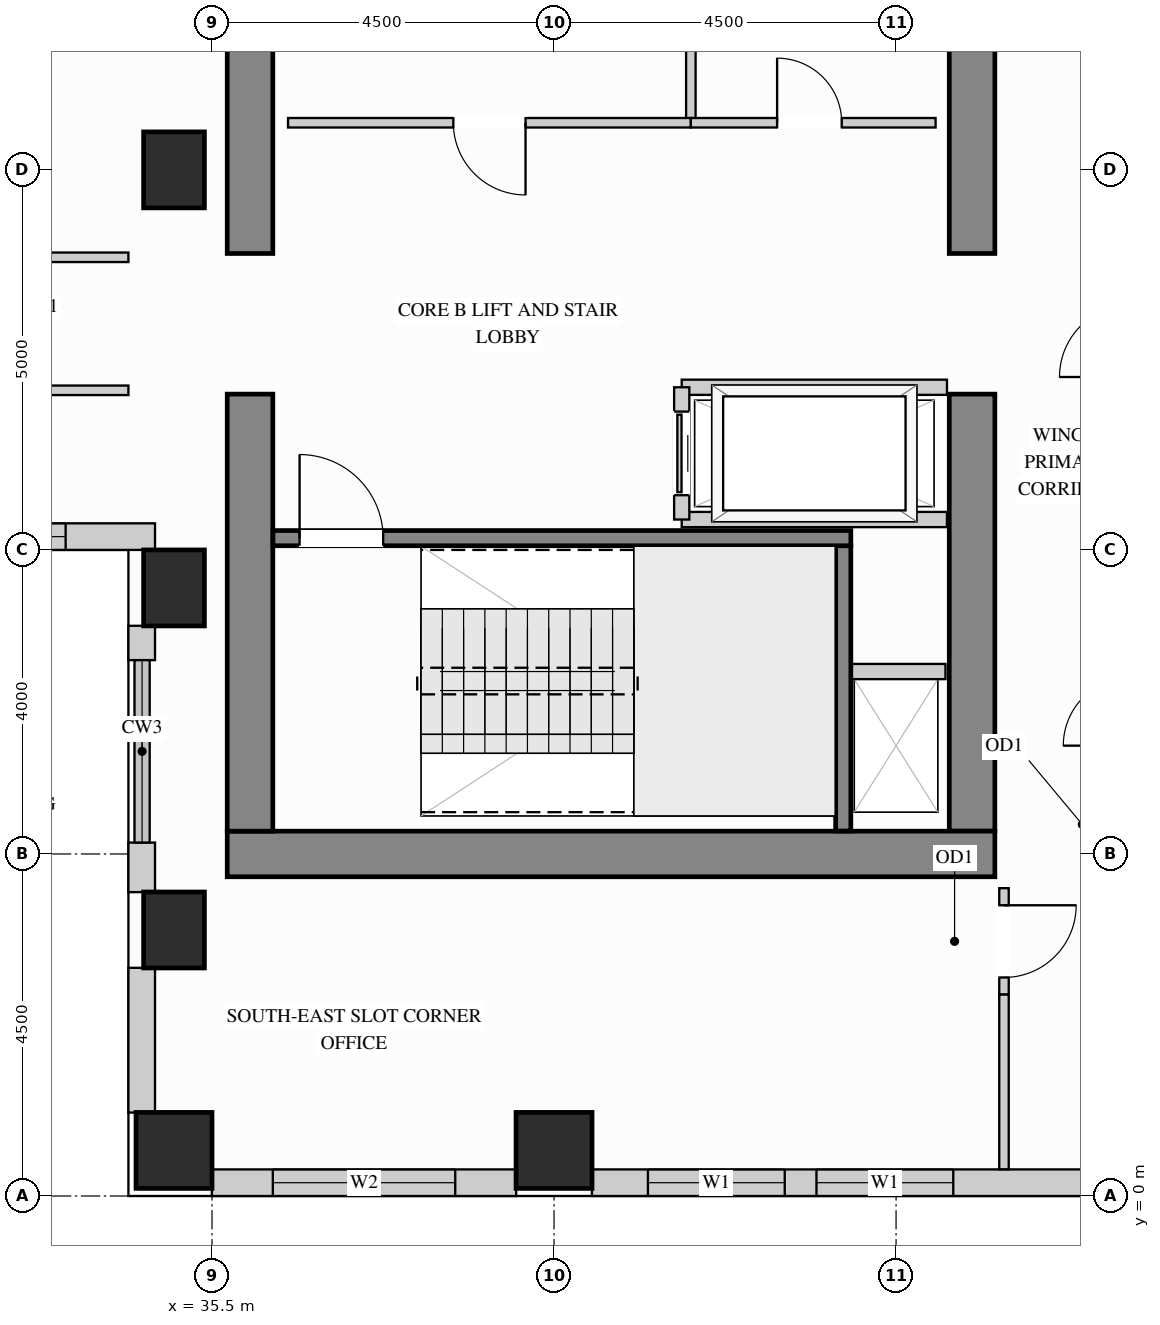
"""IFC4 building model, lengths in metres.
Left out: names, types, materials, properties, quantities, classifications, styles, units other than length and angle.
Written with IfcOpenShell. Run it as: python <this file> out.ifc"""

import sys

from ifc_helpers import new_model, si_unit, direction, frame, frame_2d, origin, origin_2d, place, context, subcontext, project, spatial, rectangle, extrude, source, transform, mapped, element, fill, save


model = new_model("IFC4")
c1 = context("Model", 3, precision=1e-05, world=origin(), true_north=direction((0.0, 1.0)))
c2 = subcontext(c1, "Body", "Model", "MODEL_VIEW")
j1 = project(units=[si_unit("LENGTHUNIT", "METRE"), si_unit("PLANEANGLEUNIT", "RADIAN")], contexts=[c1])
p1 = place(None, origin())
s1 = spatial("IfcSite", under=j1, at=p1, CompositionType="ELEMENT")
p2 = place(p1, origin())
s2 = spatial("IfcBuilding", under=s1, at=p2, CompositionType="ELEMENT")
p3 = place(p2, frame((0.0, 0.0, 175.5)))
s3 = spatial("IfcBuildingStorey", under=s2, at=p3, CompositionType="ELEMENT", Elevation=175.5)
m1 = source(origin(), c2, "Body", "SweptSolid", [
    extrude(rectangle(XDim=0.8, YDim=1.0, at=origin_2d()), origin(), (0.0, 0.0, 1.0), 3.4),
])
for number, where, z_axis, x_axis in (
    (1, (35.0, 13.5, 0.0), (0.0, 0.0, 1.0), (1.0, 0.0, 0.0)),
    (2, (35.0, 3.5, 0.0), (0.0, 0.0, 1.0), (1.0, 0.0, 0.0)),
    (3, (35.0, 8.0, 0.0), (0.0, 0.0, 1.0), (1.0, 0.0, 0.0)),
):
    element("IfcColumn", number, at=place(p3, frame(where, z_axis=z_axis, x_axis=x_axis)), inside=s3, PredefinedType="COLUMN", context=c2, shape_type="MappedRepresentation", body=[
        mapped(m1, transform((0.0, 0.0, 0.0), x_axis=(1.0, 0.0, 0.0), y_axis=(0.0, 1.0, 0.0), z_axis=(0.0, 0.0, 1.0))),
    ])
m2 = source(origin(), c2, "Body", "SweptSolid", [
    extrude(rectangle(XDim=1.0, YDim=1.0, at=origin_2d()), origin(), (0.0, 0.0, 1.0), 3.4),
])
for number, where, z_axis, x_axis in (
    (4, (35.0, 0.6, 0.0), (0.0, 0.0, 1.0), (1.0, 0.0, 0.0)),
    (5, (40.0, 0.6, 0.0), (0.0, 0.0, 1.0), (1.0, 0.0, 0.0)),
):
    element("IfcColumn", number, at=place(p3, frame(where, z_axis=z_axis, x_axis=x_axis)), inside=s3, PredefinedType="COLUMN", context=c2, shape_type="MappedRepresentation", body=[
        mapped(m2, transform((0.0, 0.0, 0.0), x_axis=(1.0, 0.0, 0.0), y_axis=(0.0, 1.0, 0.0), z_axis=(0.0, 0.0, 1.0))),
    ])
m3 = source(origin(), c2, "Body", "SweptSolid", [
    extrude(rectangle(XDim=5.75, YDim=0.6, at=frame_2d((2.875, 0.0))), origin(), (0.0, 0.0, 1.0), 3.4),
])
p4 = place(p3, frame((45.5, 4.8, 0.0), z_axis=(0.0, 0.0, 1.0), x_axis=(0.0, 1.0, 0.0)))
e6 = element("IfcWall", 6, at=p4, inside=s3, PredefinedType="SHEAR", context=c2, shape_type="MappedRepresentation", body=[
    mapped(m3, transform((0.0, 0.0, 0.0), x_axis=(1.0, 0.0, 0.0), y_axis=(0.0, 1.0, 0.0), z_axis=(0.0, 0.0, 1.0))),
])
m4 = source(origin(), c2, "Body", "SweptSolid", [
    extrude(rectangle(XDim=3.8, YDim=0.6, at=frame_2d((1.9, 0.0))), origin(), (0.0, 0.0, 1.0), 3.4),
])
p5 = place(p3, frame((45.5, 12.4, 0.0), z_axis=(0.0, 0.0, 1.0), x_axis=(0.0, 1.0, 0.0)))
e7 = element("IfcWall", 7, at=p5, inside=s3, PredefinedType="SHEAR", context=c2, shape_type="MappedRepresentation", body=[
    mapped(m4, transform((0.0, 0.0, 0.0), x_axis=(1.0, 0.0, 0.0), y_axis=(0.0, 1.0, 0.0), z_axis=(0.0, 0.0, 1.0))),
])
m5 = source(origin(), c2, "Body", "SweptSolid", [
    extrude(rectangle(XDim=10.1, YDim=0.6, at=frame_2d((5.05, 0.0))), origin(), (0.0, 0.0, 1.0), 3.4),
])
p6 = place(p3, frame((35.7, 4.5, 0.0), z_axis=(0.0, 0.0, 1.0), x_axis=(1.0, 0.0, 0.0)))
e8 = element("IfcWall", 8, at=p6, inside=s3, PredefinedType="SHEAR", context=c2, shape_type="MappedRepresentation", body=[
    mapped(m5, transform((0.0, 0.0, 0.0), x_axis=(1.0, 0.0, 0.0), y_axis=(0.0, 1.0, 0.0), z_axis=(0.0, 0.0, 1.0))),
])
p7 = place(p3, frame((36.0, 4.8, 0.0), z_axis=(0.0, 0.0, 1.0), x_axis=(0.0, 1.0, 0.0)))
e9 = element("IfcWall", 9, at=p7, inside=s3, PredefinedType="SHEAR", context=c2, shape_type="MappedRepresentation", body=[
    mapped(m3, transform((0.0, 0.0, 0.0), x_axis=(1.0, 0.0, 0.0), y_axis=(0.0, 1.0, 0.0), z_axis=(0.0, 0.0, 1.0))),
])
p8 = place(p3, frame((36.0, 12.4, 0.0), z_axis=(0.0, 0.0, 1.0), x_axis=(0.0, 1.0, 0.0)))
e10 = element("IfcWall", 10, at=p8, inside=s3, PredefinedType="SHEAR", context=c2, shape_type="MappedRepresentation", body=[
    mapped(m4, transform((0.0, 0.0, 0.0), x_axis=(1.0, 0.0, 0.0), y_axis=(0.0, 1.0, 0.0), z_axis=(0.0, 0.0, 1.0))),
])
p9 = place(p3, frame((30.898, 8.675, 0.0), z_axis=(0.0, 0.0, 1.0), x_axis=(1.0, 0.0, 0.0)))
e11 = element("IfcWall", 11, at=p9, inside=s3, PredefinedType="SOLIDWALL", context=c2, shape_type="SweptSolid", body=[
    extrude(rectangle(XDim=3.852, YDim=0.35, at=frame_2d((1.926, 0.0))), origin(), (0.0, 0.0, 1.0), 3.385),
])
p10 = place(p9, frame((1.176, 0.0, 0.78)))
e12 = element("IfcOpeningElement", 12, at=p10, cuts=e11, PredefinedType="OPENING", context=c2, shape_type="SweptSolid", body=[
    extrude(rectangle(XDim=1.5, YDim=2.0, at=frame_2d((0.75, 1.0))), frame((0.0, 0.185, 0.0), z_axis=(0.0, -1.0, 0.0), x_axis=(1.0, 0.0, 0.0)), (0.0, 0.0, 1.0), 0.37),
])
m6 = source(origin(), c2, "Body", "SweptSolid", [
    extrude(rectangle(XDim=0.452, YDim=0.35, at=frame_2d((0.226, 0.0))), origin(), (0.0, 0.0, 1.0), 2.612),
])
p11 = place(p3, frame((34.575, 7.502, 0.0), z_axis=(0.0, 0.0, 1.0), x_axis=(0.0, -1.0, 0.0)))
e13 = element("IfcWall", 13, at=p11, inside=s3, PredefinedType="SOLIDWALL", context=c2, shape_type="MappedRepresentation", body=[
    mapped(m6, transform((0.0, 0.0, 0.0), x_axis=(1.0, 0.0, 0.0), y_axis=(0.0, 1.0, 0.0), z_axis=(0.0, 0.0, 1.0))),
])
m7 = source(origin(), c2, "Body", "SweptSolid", [
    extrude(rectangle(XDim=0.652, YDim=0.35, at=frame_2d((0.326, 0.0))), origin(), (0.0, 0.0, 1.0), 2.612),
])
p12 = place(p3, frame((34.575, 4.65, 0.0), z_axis=(0.0, 0.0, 1.0), x_axis=(0.0, -1.0, 0.0)))
e14 = element("IfcWall", 14, at=p12, inside=s3, PredefinedType="SOLIDWALL", context=c2, shape_type="MappedRepresentation", body=[
    mapped(m7, transform((0.0, 0.0, 0.0), x_axis=(1.0, 0.0, 0.0), y_axis=(0.0, 1.0, 0.0), z_axis=(0.0, 0.0, 1.0))),
])
m8 = source(origin(), c2, "Body", "SweptSolid", [
    extrude(rectangle(XDim=1.904, YDim=0.35, at=frame_2d((0.952, 0.0))), origin(), (0.0, 0.0, 1.0), 2.612),
])
p13 = place(p3, frame((34.575, 3.002, 0.0), z_axis=(0.0, 0.0, 1.0), x_axis=(0.0, -1.0, 0.0)))
e15 = element("IfcWall", 15, at=p13, inside=s3, PredefinedType="SOLIDWALL", context=c2, shape_type="MappedRepresentation", body=[
    mapped(m8, transform((0.0, 0.0, 0.0), x_axis=(1.0, 0.0, 0.0), y_axis=(0.0, 1.0, 0.0), z_axis=(0.0, 0.0, 1.0))),
])
p14 = place(p3, frame((35.498, 0.175, 0.0), z_axis=(0.0, 0.0, 1.0), x_axis=(1.0, 0.0, 0.0)))
e16 = element("IfcWall", 16, at=p14, inside=s3, PredefinedType="SOLIDWALL", context=c2, shape_type="SweptSolid", body=[
    extrude(rectangle(XDim=4.004, YDim=0.35, at=frame_2d((2.002, 0.0))), origin(), (0.0, 0.0, 1.0), 2.448),
])
p15 = place(p14, frame((0.802, 0.0, 0.78)))
e17 = element("IfcOpeningElement", 17, at=p15, cuts=e16, PredefinedType="OPENING", context=c2, shape_type="SweptSolid", body=[
    extrude(rectangle(XDim=2.4, YDim=1.488, at=frame_2d((1.2, 0.744))), frame((0.0, 0.185, 0.0), z_axis=(0.0, -1.0, 0.0), x_axis=(1.0, 0.0, 0.0)), (0.0, 0.0, 1.0), 0.37),
])
p16 = place(p3, frame((40.498, 0.175, 0.0), z_axis=(0.0, 0.0, 1.0), x_axis=(1.0, 0.0, 0.0)))
e18 = element("IfcWall", 18, at=p16, inside=s3, PredefinedType="SOLIDWALL", context=c2, shape_type="SweptSolid", body=[
    extrude(rectangle(XDim=6.604, YDim=0.35, at=frame_2d((3.302, 0.0))), origin(), (0.0, 0.0, 1.0), 2.448),
])
p17 = place(p16, frame((0.737, 0.0, 0.78)))
e19 = element("IfcOpeningElement", 19, at=p17, cuts=e18, PredefinedType="OPENING", context=c2, shape_type="SweptSolid", body=[
    extrude(rectangle(XDim=1.8, YDim=1.488, at=frame_2d((0.9, 0.744))), frame((0.0, 0.185, 0.0), z_axis=(0.0, -1.0, 0.0), x_axis=(1.0, 0.0, 0.0)), (0.0, 0.0, 1.0), 0.37),
])
p18 = place(p16, frame((2.955, 0.0, 0.78)))
e20 = element("IfcOpeningElement", 20, at=p18, cuts=e18, PredefinedType="OPENING", context=c2, shape_type="SweptSolid", body=[
    extrude(rectangle(XDim=1.8, YDim=1.488, at=frame_2d((0.9, 0.744))), frame((0.0, 0.185, 0.0), z_axis=(0.0, -1.0, 0.0), x_axis=(1.0, 0.0, 0.0)), (0.0, 0.0, 1.0), 0.37),
])
m9 = source(origin(), c2, "Body", "SweptSolid", [
    extrude(rectangle(XDim=1.93, YDim=0.125, at=frame_2d((0.965, 0.0))), origin(), (0.0, 0.0, 1.0), 3.385),
])
p19 = place(p3, frame((41.8, 14.12, 0.0), z_axis=(0.0, 0.0, 1.0), x_axis=(0.0, 1.0, 0.0)))
e21 = element("IfcWall", 21, at=p19, inside=s3, PredefinedType="PARTITIONING", context=c2, shape_type="MappedRepresentation", body=[
    mapped(m9, transform((0.0, 0.0, 0.0), x_axis=(1.0, 0.0, 0.0), y_axis=(0.0, 1.0, 0.0), z_axis=(0.0, 0.0, 1.0))),
])
p20 = place(p3, frame((36.5, 14.12, 0.0), z_axis=(0.0, 0.0, 1.0), x_axis=(1.0, 0.0, 0.0)))
e22 = element("IfcWall", 22, at=p20, inside=s3, PredefinedType="PARTITIONING", context=c2, shape_type="SweptSolid", body=[
    extrude(rectangle(XDim=5.3, YDim=0.125, at=frame_2d((2.65, 0.0))), origin(), (0.0, 0.0, 1.0), 3.385),
])
p21 = place(p20, frame((2.175, 0.0, 0.0)))
e23 = element("IfcOpeningElement", 23, at=p21, cuts=e22, PredefinedType="OPENING", context=c2, shape_type="SweptSolid", body=[
    extrude(rectangle(XDim=0.95, YDim=2.15, at=frame_2d((0.475, 1.075))), frame((0.0, 0.073, 0.0), z_axis=(0.0, -1.0, 0.0), x_axis=(1.0, 0.0, 0.0)), (0.0, 0.0, 1.0), 0.145),
])
p22 = place(p3, frame((41.8, 14.12, 0.0), z_axis=(0.0, 0.0, 1.0), x_axis=(1.0, 0.0, 0.0)))
e24 = element("IfcWall", 24, at=p22, inside=s3, PredefinedType="PARTITIONING", context=c2, shape_type="SweptSolid", body=[
    extrude(rectangle(XDim=3.22, YDim=0.125, at=frame_2d((1.61, 0.0))), origin(), (0.0, 0.0, 1.0), 3.385),
])
p23 = place(p22, frame((1.135, 0.0, 0.0)))
e25 = element("IfcOpeningElement", 25, at=p23, cuts=e24, PredefinedType="OPENING", context=c2, shape_type="SweptSolid", body=[
    extrude(rectangle(XDim=0.85, YDim=2.1, at=frame_2d((0.425, 1.05))), frame((0.0, 0.073, 0.0), z_axis=(0.0, -1.0, 0.0), x_axis=(1.0, 0.0, 0.0)), (0.0, 0.0, 1.0), 0.145),
])
p24 = place(p3, frame((45.92, 2.65, 0.0), z_axis=(0.0, 0.0, 1.0), x_axis=(0.0, 1.0, 0.0)))
e26 = element("IfcWall", 26, at=p24, inside=s3, PredefinedType="PARTITIONING", context=c2, shape_type="SweptSolid", body=[
    extrude(rectangle(XDim=1.4, YDim=0.125, at=frame_2d((0.7, 0.0))), origin(), (0.0, 0.0, 1.0), 3.385),
])
p25 = place(p24, frame((0.225, 0.0, 0.0)))
e27 = element("IfcOpeningElement", 27, at=p25, cuts=e26, PredefinedType="OPENING", context=c2, shape_type="SweptSolid", body=[
    extrude(rectangle(XDim=0.95, YDim=2.15, at=frame_2d((0.475, 1.075))), frame((0.0, 0.073, 0.0), z_axis=(0.0, -1.0, 0.0), x_axis=(1.0, 0.0, 0.0)), (0.0, 0.0, 1.0), 0.145),
])
m10 = source(origin(), c2, "Body", "SweptSolid", [
    extrude(rectangle(XDim=2.298, YDim=0.125, at=frame_2d((1.149, 0.0))), origin(), (0.0, 0.0, 1.0), 3.385),
])
p26 = place(p3, frame((45.92, 0.352, 0.0), z_axis=(0.0, 0.0, 1.0), x_axis=(0.0, 1.0, 0.0)))
e28 = element("IfcWall", 28, at=p26, inside=s3, PredefinedType="PARTITIONING", context=c2, shape_type="MappedRepresentation", body=[
    mapped(m10, transform((0.0, 0.0, 0.0), x_axis=(1.0, 0.0, 0.0), y_axis=(0.0, 1.0, 0.0), z_axis=(0.0, 0.0, 1.0))),
])
p27 = place(p3, frame((29.85, 12.35, 0.0), z_axis=(0.0, 0.0, 1.0), x_axis=(1.0, 0.0, 0.0)))
e29 = element("IfcWall", 29, at=p27, inside=s3, PredefinedType="PARTITIONING", context=c2, shape_type="SweptSolid", body=[
    extrude(rectangle(XDim=4.55, YDim=0.125, at=frame_2d((2.275, 0.0))), origin(), (0.0, 0.0, 1.0), 3.385),
])
p28 = place(p27, frame((1.8, 0.0, 0.0)))
e30 = element("IfcOpeningElement", 30, at=p28, cuts=e29, PredefinedType="OPENING", context=c2, shape_type="SweptSolid", body=[
    extrude(rectangle(XDim=0.95, YDim=2.15, at=frame_2d((0.475, 1.075))), frame((0.0, 0.073, 0.0), z_axis=(0.0, -1.0, 0.0), x_axis=(1.0, 0.0, 0.0)), (0.0, 0.0, 1.0), 0.145),
])
p29 = place(p3, frame((29.85, 10.6, 0.0), z_axis=(0.0, 0.0, 1.0), x_axis=(1.0, 0.0, 0.0)))
e31 = element("IfcWall", 31, at=p29, inside=s3, PredefinedType="PARTITIONING", context=c2, shape_type="SweptSolid", body=[
    extrude(rectangle(XDim=4.55, YDim=0.125, at=frame_2d((2.275, 0.0))), origin(), (0.0, 0.0, 1.0), 3.385),
])
p30 = place(p29, frame((1.8, 0.0, 0.0)))
e32 = element("IfcOpeningElement", 32, at=p30, cuts=e31, PredefinedType="OPENING", context=c2, shape_type="SweptSolid", body=[
    extrude(rectangle(XDim=0.95, YDim=2.15, at=frame_2d((0.475, 1.075))), frame((0.0, 0.073, 0.0), z_axis=(0.0, -1.0, 0.0), x_axis=(1.0, 0.0, 0.0)), (0.0, 0.0, 1.0), 0.145),
])
m11 = source(origin(), c2, "Body", "SweptSolid", [
    extrude(rectangle(XDim=1.3, YDim=0.2, at=frame_2d((0.65, 0.0))), origin(), (0.0, 0.0, 1.0), 3.385),
])
p31 = place(p3, frame((43.85, 6.9, 0.0), z_axis=(0.0, 0.0, 1.0), x_axis=(1.0, 0.0, 0.0)))
e33 = element("IfcWall", 33, at=p31, inside=s3, PredefinedType="PARTITIONING", context=c2, shape_type="MappedRepresentation", body=[
    mapped(m11, transform((0.0, 0.0, 0.0), x_axis=(1.0, 0.0, 0.0), y_axis=(0.0, 1.0, 0.0), z_axis=(0.0, 0.0, 1.0))),
])
m12 = source(origin(), c2, "Body", "SweptSolid", [
    extrude(rectangle(XDim=3.49, YDim=0.2, at=frame_2d((1.745, 0.0))), origin(), (0.0, 0.0, 1.0), 3.385),
])
for number, where, z_axis, x_axis in (
    (34, (41.68, 10.64, 0.0), (0.0, 0.0, 1.0), (1.0, 0.0, 0.0)),
    (35, (41.68, 8.9, 0.0), (0.0, 0.0, 1.0), (1.0, 0.0, 0.0)),
):
    element("IfcWall", number, at=place(p3, frame(where, z_axis=z_axis, x_axis=x_axis)), inside=s3, PredefinedType="PARTITIONING", context=c2, shape_type="MappedRepresentation", body=[
        mapped(m12, transform((0.0, 0.0, 0.0), x_axis=(1.0, 0.0, 0.0), y_axis=(0.0, 1.0, 0.0), z_axis=(0.0, 0.0, 1.0))),
    ])
p32 = place(p3, frame((41.68, 8.9, 0.0), z_axis=(0.0, 0.0, 1.0), x_axis=(0.0, 1.0, 0.0)))
e36 = element("IfcWall", 36, at=p32, inside=s3, PredefinedType="PARTITIONING", context=c2, shape_type="SweptSolid", body=[
    extrude(rectangle(XDim=1.74, YDim=0.2, at=frame_2d((0.87, 0.0))), origin(), (0.0, 0.0, 1.0), 3.385),
])
p33 = place(p32, frame((0.32, 0.0, 0.0)))
e37 = element("IfcOpeningElement", 37, at=p33, cuts=e36, PredefinedType="OPENING", context=c2, shape_type="SweptSolid", body=[
    extrude(rectangle(XDim=1.1, YDim=2.2, at=frame_2d((0.55, 1.1))), frame((0.0, 0.11, 0.0), z_axis=(0.0, -1.0, 0.0), x_axis=(1.0, 0.0, 0.0)), (0.0, 0.0, 1.0), 0.22),
])
m13 = source(origin(), c2, "Body", "SweptSolid", [
    extrude(rectangle(XDim=3.753, YDim=0.2, at=frame_2d((1.876, 0.0))), origin(), (0.0, 0.0, 1.0), 3.4),
])
p34 = place(p3, frame((43.805, 4.802, 0.0), z_axis=(0.0, 0.0, 1.0), x_axis=(0.0, 1.0, 0.0)))
e38 = element("IfcWall", 38, at=p34, inside=s3, PredefinedType="SHEAR", context=c2, shape_type="MappedRepresentation", body=[
    mapped(m13, transform((0.0, 0.0, 0.0), x_axis=(1.0, 0.0, 0.0), y_axis=(0.0, 1.0, 0.0), z_axis=(0.0, 0.0, 1.0))),
])
p35 = place(p3, frame((36.302, 8.655, 0.0), z_axis=(0.0, 0.0, 1.0), x_axis=(1.0, 0.0, 0.0)))
e39 = element("IfcWall", 39, at=p35, inside=s3, PredefinedType="SHEAR", context=c2, shape_type="SweptSolid", body=[
    extrude(rectangle(XDim=7.603, YDim=0.2, at=frame_2d((3.802, 0.0))), origin(), (0.0, 0.0, 1.0), 3.4),
])
p36 = place(p35, frame((0.35, 0.0, 0.0)))
e40 = element("IfcOpeningElement", 40, at=p36, cuts=e39, PredefinedType="OPENING", context=c2, shape_type="SweptSolid", body=[
    extrude(rectangle(XDim=1.1, YDim=2.15, at=frame_2d((0.55, 1.075))), frame((0.0, 0.11, 0.0), z_axis=(0.0, -1.0, 0.0), x_axis=(1.0, 0.0, 0.0)), (0.0, 0.0, 1.0), 0.22),
])
m14 = source(origin(), c2, "Body", "SweptSolid", [
    extrude(rectangle(XDim=1.1, YDim=2.2, at=frame_2d((0.55, 1.1))), frame((0.0, 0.025, 0.0), z_axis=(0.0, -1.0, 0.0), x_axis=(1.0, 0.0, 0.0)), (0.0, 0.0, 1.0), 0.05),
])
p37 = place(p33, origin())
e41 = element("IfcDoor", 41, at=p37, inside=s3, OperationType="SLIDING_TO_LEFT", PredefinedType="DOOR", context=c2, shape_type="MappedRepresentation", body=[
    mapped(m14, transform((0.0, 0.0, 0.0), x_axis=(1.0, 0.0, 0.0), y_axis=(0.0, 1.0, 0.0), z_axis=(0.0, 0.0, 1.0))),
])
fill(e37, e41)
m15 = source(origin(), c2, "Body", "SweptSolid", [
    extrude(rectangle(XDim=0.95, YDim=2.15, at=frame_2d((0.475, 1.075))), frame((0.0, 0.025, 0.0), z_axis=(0.0, -1.0, 0.0), x_axis=(1.0, 0.0, 0.0)), (0.0, 0.0, 1.0), 0.05),
])
p38 = place(p21, origin())
e42 = element("IfcDoor", 42, at=p38, inside=s3, OperationType="SINGLE_SWING_RIGHT", PredefinedType="DOOR", context=c2, shape_type="MappedRepresentation", body=[
    mapped(m15, transform((0.0, 0.0, 0.0), x_axis=(1.0, 0.0, 0.0), y_axis=(0.0, 1.0, 0.0), z_axis=(0.0, 0.0, 1.0))),
])
fill(e23, e42)
p39 = place(p25, origin())
e43 = element("IfcDoor", 43, at=p39, inside=s3, OperationType="SINGLE_SWING_RIGHT", PredefinedType="DOOR", context=c2, shape_type="MappedRepresentation", body=[
    mapped(m15, transform((0.0, 0.0, 0.0), x_axis=(1.0, 0.0, 0.0), y_axis=(0.0, 1.0, 0.0), z_axis=(0.0, 0.0, 1.0))),
])
fill(e27, e43)
m16 = source(origin(), c2, "Body", "SweptSolid", [
    extrude(rectangle(XDim=0.85, YDim=2.1, at=frame_2d((0.425, 1.05))), frame((0.0, 0.025, 0.0), z_axis=(0.0, -1.0, 0.0), x_axis=(1.0, 0.0, 0.0)), (0.0, 0.0, 1.0), 0.05),
])
p40 = place(p23, origin())
e44 = element("IfcDoor", 44, at=p40, inside=s3, OperationType="SINGLE_SWING_LEFT", PredefinedType="DOOR", context=c2, shape_type="MappedRepresentation", body=[
    mapped(m16, transform((0.0, 0.0, 0.0), x_axis=(1.0, 0.0, 0.0), y_axis=(0.0, 1.0, 0.0), z_axis=(0.0, 0.0, 1.0))),
])
fill(e25, e44)
m17 = source(origin(), c2, "Body", "SweptSolid", [
    extrude(rectangle(XDim=1.1, YDim=2.15, at=frame_2d((0.55, 1.075))), frame((0.0, 0.025, 0.0), z_axis=(0.0, -1.0, 0.0), x_axis=(1.0, 0.0, 0.0)), (0.0, 0.0, 1.0), 0.05),
])
p41 = place(p36, origin())
e45 = element("IfcDoor", 45, at=p41, inside=s3, OperationType="SINGLE_SWING_LEFT", PredefinedType="DOOR", context=c2, shape_type="MappedRepresentation", body=[
    mapped(m17, transform((0.0, 0.0, 0.0), x_axis=(1.0, 0.0, 0.0), y_axis=(0.0, 1.0, 0.0), z_axis=(0.0, 0.0, 1.0))),
])
fill(e40, e45)
m18 = source(origin(), c2, "Body", "SweptSolid", [
    extrude(rectangle(XDim=1.8, YDim=1.488, at=frame_2d((0.9, 0.744))), frame((0.0, 0.03, 0.0), z_axis=(0.0, -1.0, 0.0), x_axis=(1.0, 0.0, 0.0)), (0.0, 0.0, 1.0), 0.06),
])
p42 = place(p17, origin())
e46 = element("IfcWindow", 46, at=p42, inside=s3, PartitioningType="SINGLE_PANEL", PredefinedType="WINDOW", context=c2, shape_type="MappedRepresentation", body=[
    mapped(m18, transform((0.0, 0.0, 0.0), x_axis=(1.0, 0.0, 0.0), y_axis=(0.0, 1.0, 0.0), z_axis=(0.0, 0.0, 1.0))),
])
fill(e19, e46)
p43 = place(p18, origin())
e47 = element("IfcWindow", 47, at=p43, inside=s3, PartitioningType="SINGLE_PANEL", PredefinedType="WINDOW", context=c2, shape_type="MappedRepresentation", body=[
    mapped(m18, transform((0.0, 0.0, 0.0), x_axis=(1.0, 0.0, 0.0), y_axis=(0.0, 1.0, 0.0), z_axis=(0.0, 0.0, 1.0))),
])
fill(e20, e47)
m19 = source(origin(), c2, "Body", "SweptSolid", [
    extrude(rectangle(XDim=2.4, YDim=1.488, at=frame_2d((1.2, 0.744))), frame((0.0, 0.03, 0.0), z_axis=(0.0, -1.0, 0.0), x_axis=(1.0, 0.0, 0.0)), (0.0, 0.0, 1.0), 0.06),
])
p44 = place(p15, origin())
e48 = element("IfcWindow", 48, at=p44, inside=s3, PartitioningType="SINGLE_PANEL", PredefinedType="WINDOW", context=c2, shape_type="MappedRepresentation", body=[
    mapped(m19, transform((0.0, 0.0, 0.0), x_axis=(1.0, 0.0, 0.0), y_axis=(0.0, 1.0, 0.0), z_axis=(0.0, 0.0, 1.0))),
])
fill(e17, e48)
m20 = source(origin(), c2, "Body", "SweptSolid", [
    extrude(rectangle(XDim=1.5, YDim=2.0, at=frame_2d((0.75, 1.0))), frame((0.0, 0.03, 0.0), z_axis=(0.0, -1.0, 0.0), x_axis=(1.0, 0.0, 0.0)), (0.0, 0.0, 1.0), 0.06),
])
p45 = place(p10, origin())
e49 = element("IfcWindow", 49, at=p45, inside=s3, PartitioningType="SINGLE_PANEL", PredefinedType="WINDOW", context=c2, shape_type="MappedRepresentation", body=[
    mapped(m20, transform((0.0, 0.0, 0.0), x_axis=(1.0, 0.0, 0.0), y_axis=(0.0, 1.0, 0.0), z_axis=(0.0, 0.0, 1.0))),
])
fill(e12, e49)
save(model, sys.argv[1])
